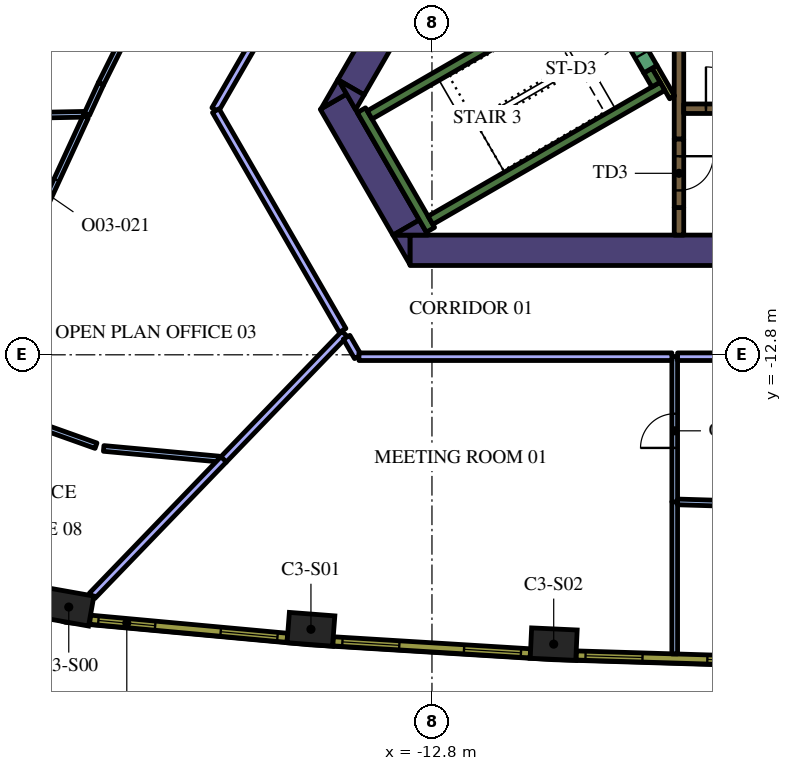
"""IFC4 building model, lengths in metres.
Left out: names, types, materials, properties, quantities, classifications, styles, units other than length and angle.
Written with IfcOpenShell. Run it as: python <this file> out.ifc"""

import sys

from ifc_helpers import new_model, si_unit, direction, frame, frame_2d, origin, origin_2d, place, context, subcontext, project, spatial, polyline, rectangle, outline, extrude, element, fill, save


model = new_model("IFC4")
c1 = context("Model", 3, precision=1e-05, world=origin(), true_north=direction((0.0, 1.0)))
c2 = subcontext(c1, "Body", "Model", "MODEL_VIEW")
j1 = project(units=[si_unit("LENGTHUNIT", "METRE"), si_unit("PLANEANGLEUNIT", "RADIAN")], contexts=[c1])
p1 = place(None, origin())
s1 = spatial("IfcSite", under=j1, at=p1, CompositionType="ELEMENT")
p2 = place(p1, origin())
s2 = spatial("IfcBuilding", under=s1, at=p2, CompositionType="ELEMENT")
p3 = place(p2, frame((0.0, 0.0, 166.8)))
s3 = spatial("IfcBuildingStorey", under=s2, at=p3, CompositionType="ELEMENT", Elevation=166.8)
for number, where, z_axis, x_axis in (
    (1, (-22.357, -19.437, 0.0), (0.0, 0.0, 1.0), (0.985, -0.175, 0.0)),
    (2, (-15.985, -20.022, 0.0), (0.0, 0.0, 1.0), (0.997, -0.076, 0.0)),
    (3, (-9.597, -20.413, 0.0), (0.0, 0.0, 1.0), (0.999, -0.046, 0.0)),
):
    element("IfcColumn", number, at=place(p3, frame(where, z_axis=z_axis, x_axis=x_axis)), inside=s3, PredefinedType="COLUMN", context=c2, shape_type="SweptSolid", body=[
        extrude(rectangle(XDim=1.2, YDim=0.8, at=origin_2d()), origin(), (0.0, 0.0, 1.0), 4.2),
    ])
p4 = place(p3, frame((-13.378, -10.05, 0.0), z_axis=(0.0, 0.0, 1.0), x_axis=(1.0, 0.0, 0.0)))
e4 = element("IfcWall", 4, at=p4, inside=s3, PredefinedType="SOLIDWALL", context=c2, shape_type="SweptSolid", body=[
    extrude(rectangle(XDim=22.282, YDim=0.8, at=frame_2d((11.141, 0.0))), origin(), (0.0, 0.0, 1.0), 4.2),
])
p5 = place(p3, origin())
e5 = element("IfcWall", 5, at=p5, inside=s3, PredefinedType="SOLIDWALL", context=c2, shape_type="SweptSolid", body=[
    extrude(outline(polyline([(-13.828, -9.65), (-13.38, -9.65), (-13.38, -10.426), (-13.828, -9.65)])), origin(), (0.0, 0.0, 1.0), 4.2),
])
p6 = place(p3, frame((-15.392, -6.14, 0.0), z_axis=(0.0, 0.0, 1.0), x_axis=(0.499984020225, -0.866034629516, 0.0)))
e6 = element("IfcWall", 6, at=p6, inside=s3, PredefinedType="SOLIDWALL", context=c2, shape_type="SweptSolid", body=[
    extrude(rectangle(XDim=3.824, YDim=0.8, at=frame_2d((1.912, 0.0))), origin(), (0.0, 0.0, 1.0), 4.2),
])
e7 = element("IfcWall", 7, at=p5, inside=s3, PredefinedType="SOLIDWALL", context=c2, shape_type="SweptSolid", body=[
    extrude(outline(polyline([(-15.047, -5.938), (-15.719, -6.326), (-15.271, -5.55), (-15.047, -5.938)])), origin(), (0.0, 0.0, 1.0), 4.2),
])
e8 = element("IfcWall", 8, at=p5, inside=s3, PredefinedType="SOLIDWALL", context=c2, shape_type="SweptSolid", body=[
    extrude(outline(polyline([(-12.904, -9.65), (-13.82, -9.65), (-13.133, -9.253), (-12.904, -9.65)])), origin(), (0.0, 0.0, 1.0), 4.2),
])
p7 = place(p3, frame((-13.518, -3.314, 0.0), z_axis=(0.0, 0.0, 1.0), x_axis=(-0.499969377405, -0.866043083026, 0.0)))
e9 = element("IfcWall", 9, at=p7, inside=s3, PredefinedType="SOLIDWALL", context=c2, shape_type="SweptSolid", body=[
    extrude(rectangle(XDim=2.824, YDim=0.8, at=frame_2d((1.412, 0.0))), origin(), (0.0, 0.0, 1.0), 4.2),
])
e10 = element("IfcWall", 10, at=p5, inside=s3, PredefinedType="SOLIDWALL", context=c2, shape_type="SweptSolid", body=[
    extrude(outline(polyline([(-14.809, -6.35), (-15.257, -5.574), (-14.585, -5.962), (-14.809, -6.35)])), origin(), (0.0, 0.0, 1.0), 4.2),
])
p8 = place(p3, frame((-12.84, -9.511, 0.0), z_axis=(0.0, 0.0, 1.0), x_axis=(-0.499997733992, 0.866026712061, 0.0)))
e11 = element("IfcWall", 11, at=p8, inside=s3, PredefinedType="SOLIDWALL", context=c2, shape_type="SweptSolid", body=[
    extrude(rectangle(XDim=3.634, YDim=0.25, at=frame_2d((1.817, 0.0))), origin(), (0.0, 0.0, 1.0), 4.2),
])
p9 = place(p3, frame((-14.44, -6.49, 0.0), z_axis=(0.0, 0.0, 1.0), x_axis=(0.866022966069, 0.500004222222, 0.0)))
e12 = element("IfcWall", 12, at=p9, inside=s3, PredefinedType="SOLIDWALL", context=c2, shape_type="SweptSolid", body=[
    extrude(rectangle(XDim=6.8, YDim=0.25, at=frame_2d((3.4, 0.0))), origin(), (0.0, 0.0, 1.0), 4.2),
])
p10 = place(p3, frame((-12.84, -9.261, 0.0), z_axis=(0.0, 0.0, 1.0), x_axis=(0.866016039709, 0.500016218704, 0.0)))
e13 = element("IfcWall", 13, at=p10, inside=s3, PredefinedType="SOLIDWALL", context=c2, shape_type="SweptSolid", body=[
    extrude(rectangle(XDim=7.05, YDim=0.25, at=frame_2d((3.525, 0.0))), origin(), (0.0, 0.0, 1.0), 4.2),
])
p11 = place(p3, frame((-6.905, -5.69, 0.0), z_axis=(0.0, 0.0, 1.0), x_axis=(-0.500402024738, 0.865793170242, 0.0)))
e14 = element("IfcWall", 14, at=p11, inside=s3, PredefinedType="SOLIDWALL", context=c2, shape_type="SweptSolid", body=[
    extrude(rectangle(XDim=0.425, YDim=0.25, at=frame_2d((0.212, 0.0))), origin(), (0.0, 0.0, 1.0), 4.2),
])
p12 = place(p3, frame((-6.3, -8.925, 0.0), z_axis=(0.0, 0.0, 1.0), x_axis=(0.0, -1.0, 0.0)))
e15 = element("IfcWall", 15, at=p12, inside=s3, PredefinedType="SOLIDWALL", context=c2, shape_type="SweptSolid", body=[
    extrude(rectangle(XDim=0.725, YDim=0.25, at=frame_2d((0.363, 0.0))), origin(), (0.0, 0.0, 1.0), 4.2),
])
p13 = place(p3, frame((-6.3, -7.125, 0.0), z_axis=(0.0, 0.0, 1.0), x_axis=(0.0, 1.0, 0.0)))
e16 = element("IfcWall", 16, at=p13, inside=s3, PredefinedType="SOLIDWALL", context=c2, shape_type="SweptSolid", body=[
    extrude(rectangle(XDim=3.125, YDim=0.25, at=frame_2d((1.562, 0.0))), origin(), (0.0, 0.0, 1.0), 4.2),
])
p14 = place(p3, frame((-6.48, -6.027, 0.0), z_axis=(0.0, 0.0, 1.0), x_axis=(-0.499927229454, 0.866067413802, 0.0)))
e17 = element("IfcWall", 17, at=p14, inside=s3, PredefinedType="PARTITIONING", context=c2, shape_type="SweptSolid", body=[
    extrude(rectangle(XDim=0.929, YDim=0.15, at=frame_2d((0.464, 0.0))), origin(), (0.0, 0.0, 1.0), 4.2),
])
p15 = place(p3, frame((-6.175, -6.325, 0.0), z_axis=(0.0, 0.0, 1.0), x_axis=(1.0, 0.0, 0.0)))
e18 = element("IfcWall", 18, at=p15, inside=s3, PredefinedType="SOLIDWALL", context=c2, shape_type="SweptSolid", body=[
    extrude(rectangle(XDim=12.35, YDim=0.25, at=frame_2d((6.175, 0.0))), origin(), (0.0, 0.0, 1.0), 4.2),
])
p16 = place(p15, frame((0.585, 0.0, 0.0)))
e19 = element("IfcOpeningElement", 19, at=p16, cuts=e18, PredefinedType="OPENING", context=c2, shape_type="SweptSolid", body=[
    extrude(rectangle(XDim=1.1, YDim=2.1, at=frame_2d((0.55, 1.05))), frame((0.0, 0.135, 0.0), z_axis=(0.0, -1.0, 0.0), x_axis=(1.0, 0.0, 0.0)), (0.0, 0.0, 1.0), 0.27),
])
p17 = place(p15, frame((3.105, 0.0, 0.0)))
e20 = element("IfcOpeningElement", 20, at=p17, cuts=e18, PredefinedType="OPENING", context=c2, shape_type="SweptSolid", body=[
    extrude(rectangle(XDim=1.1, YDim=2.1, at=frame_2d((0.55, 1.05))), frame((0.0, 0.135, 0.0), z_axis=(0.0, -1.0, 0.0), x_axis=(1.0, 0.0, 0.0)), (0.0, 0.0, 1.0), 0.27),
])
p18 = place(p15, frame((5.625, 0.0, 0.0)))
e21 = element("IfcOpeningElement", 21, at=p18, cuts=e18, PredefinedType="OPENING", context=c2, shape_type="SweptSolid", body=[
    extrude(rectangle(XDim=1.1, YDim=2.1, at=frame_2d((0.55, 1.05))), frame((0.0, 0.135, 0.0), z_axis=(0.0, -1.0, 0.0), x_axis=(1.0, 0.0, 0.0)), (0.0, 0.0, 1.0), 0.27),
])
p19 = place(p15, frame((8.145, 0.0, 0.0)))
e22 = element("IfcOpeningElement", 22, at=p19, cuts=e18, PredefinedType="OPENING", context=c2, shape_type="SweptSolid", body=[
    extrude(rectangle(XDim=1.1, YDim=2.1, at=frame_2d((0.55, 1.05))), frame((0.0, 0.135, 0.0), z_axis=(0.0, -1.0, 0.0), x_axis=(1.0, 0.0, 0.0)), (0.0, 0.0, 1.0), 0.27),
])
p20 = place(p15, frame((10.665, 0.0, 0.0)))
e23 = element("IfcOpeningElement", 23, at=p20, cuts=e18, PredefinedType="OPENING", context=c2, shape_type="SweptSolid", body=[
    extrude(rectangle(XDim=1.1, YDim=2.1, at=frame_2d((0.55, 1.05))), frame((0.0, 0.135, 0.0), z_axis=(0.0, -1.0, 0.0), x_axis=(1.0, 0.0, 0.0)), (0.0, 0.0, 1.0), 0.27),
])
p21 = place(p3, frame((-8.103, -3.466, 0.0), z_axis=(0.0, 0.0, 1.0), x_axis=(0.500078061341, -0.865980330357, 0.0)))
e24 = element("IfcWall", 24, at=p21, inside=s3, PredefinedType="SOLIDWALL", context=c2, shape_type="SweptSolid", body=[
    extrude(rectangle(XDim=2.1, YDim=0.4, at=frame_2d((1.05, 0.0))), origin(), (0.0, 0.0, 1.0), 4.2),
])
p22 = place(p21, frame((0.45, 0.0, 0.0)))
e25 = element("IfcOpeningElement", 25, at=p22, cuts=e24, PredefinedType="OPENING", context=c2, shape_type="SweptSolid", body=[
    extrude(rectangle(XDim=1.2, YDim=2.1, at=frame_2d((0.6, 1.05))), frame((0.0, 0.21, 0.0), z_axis=(0.0, -1.0, 0.0), x_axis=(1.0, 0.0, 0.0)), (0.0, 0.0, 1.0), 0.42),
])
p23 = place(p3, frame((-6.3, -7.125, 0.0), z_axis=(0.0, 0.0, 1.0), x_axis=(0.0, -1.0, 0.0)))
e26 = element("IfcWall", 26, at=p23, inside=s3, PredefinedType="SOLIDWALL", context=c2, shape_type="SweptSolid", body=[
    extrude(rectangle(XDim=1.8, YDim=0.25, at=frame_2d((0.9, 0.0))), origin(), (0.0, 0.0, 1.0), 4.2),
])
p24 = place(p23, frame((0.45, 0.0, 0.0)))
e27 = element("IfcOpeningElement", 27, at=p24, cuts=e26, PredefinedType="OPENING", context=c2, shape_type="SweptSolid", body=[
    extrude(rectangle(XDim=0.9, YDim=2.1, at=frame_2d((0.45, 1.05))), frame((0.0, 0.135, 0.0), z_axis=(0.0, -1.0, 0.0), x_axis=(1.0, 0.0, 0.0)), (0.0, 0.0, 1.0), 0.27),
])
p25 = place(p3, frame((-6.412, -16.664, 0.0), z_axis=(0.0, 0.0, 1.0), x_axis=(0.0, -1.0, 0.0)))
e28 = element("IfcWall", 28, at=p25, inside=s3, PredefinedType="PARTITIONING", context=c2, shape_type="SweptSolid", body=[
    extrude(rectangle(XDim=4.006, YDim=0.15, at=frame_2d((2.003, 0.0))), origin(), (0.0, 0.0, 1.0), 3.15),
])
p26 = place(p3, frame((-6.412, -16.672, 0.0), z_axis=(0.0, 0.0, 1.0), x_axis=(0.0, 1.0, 0.0)))
e29 = element("IfcWall", 29, at=p26, inside=s3, PredefinedType="PARTITIONING", context=c2, shape_type="SweptSolid", body=[
    extrude(rectangle(XDim=3.822, YDim=0.15, at=frame_2d((1.911, 0.0))), origin(), (0.0, 0.0, 1.0), 3.15),
])
p27 = place(p26, frame((1.422, 0.0, 0.0)))
e30 = element("IfcOpeningElement", 30, at=p27, cuts=e29, PredefinedType="OPENING", context=c2, shape_type="SweptSolid", body=[
    extrude(rectangle(XDim=0.9, YDim=2.1, at=frame_2d((0.45, 1.05))), frame((0.0, 0.085, 0.0), z_axis=(0.0, -1.0, 0.0), x_axis=(1.0, 0.0, 0.0)), (0.0, 0.0, 1.0), 0.17),
])
p28 = place(p3, frame((-18.288, -15.557, 0.0), z_axis=(0.0, 0.0, 1.0), x_axis=(0.693944823318, 0.720028181525, 0.0)))
e31 = element("IfcWall", 31, at=p28, inside=s3, PredefinedType="PARTITIONING", context=c2, shape_type="SweptSolid", body=[
    extrude(rectangle(XDim=4.596, YDim=0.2, at=frame_2d((2.298, 0.0))), origin(), (0.0, 0.0, 1.0), 3.15),
])
p29 = place(p3, frame((-21.742, -19.14, 0.0), z_axis=(0.0, 0.0, 1.0), x_axis=(0.693986944276, 0.719987584042, 0.0)))
e32 = element("IfcWall", 32, at=p29, inside=s3, PredefinedType="PARTITIONING", context=c2, shape_type="SweptSolid", body=[
    extrude(rectangle(XDim=4.986, YDim=0.2, at=frame_2d((2.493, 0.0))), origin(), (0.0, 0.0, 1.0), 3.15),
])
p30 = place(p3, frame((-15.047, -12.338, 0.0), z_axis=(0.0, 0.0, 1.0), x_axis=(0.500091824179, -0.865972382579, 0.0)))
e33 = element("IfcWall", 33, at=p30, inside=s3, PredefinedType="PARTITIONING", context=c2, shape_type="SweptSolid", body=[
    extrude(rectangle(XDim=0.591, YDim=0.2, at=frame_2d((0.296, 0.0))), origin(), (0.0, 0.0, 1.0), 3.15),
])
p31 = place(p3, frame((-14.721, -12.85, 0.0), z_axis=(0.0, 0.0, 1.0), x_axis=(1.0, 0.0, 0.0)))
e34 = element("IfcWall", 34, at=p31, inside=s3, PredefinedType="PARTITIONING", context=c2, shape_type="SweptSolid", body=[
    extrude(rectangle(XDim=8.234, YDim=0.2, at=frame_2d((4.117, 0.0))), origin(), (0.0, 0.0, 1.0), 3.15),
])
p32 = place(p3, frame((-6.337, -16.671, 0.0), z_axis=(0.0, 0.0, 1.0), x_axis=(0.999533369646, -0.030545751995, 0.0)))
e35 = element("IfcWall", 35, at=p32, inside=s3, PredefinedType="PARTITIONING", context=c2, shape_type="SweptSolid", body=[
    extrude(rectangle(XDim=3.197, YDim=0.15, at=frame_2d((1.599, 0.0))), origin(), (0.0, 0.0, 1.0), 3.15),
])
p33 = place(p3, frame((-6.337, -12.85, 0.0), z_axis=(0.0, 0.0, 1.0), x_axis=(1.0, 0.0, 0.0)))
e36 = element("IfcWall", 36, at=p33, inside=s3, PredefinedType="PARTITIONING", context=c2, shape_type="SweptSolid", body=[
    extrude(rectangle(XDim=2.303, YDim=0.2, at=frame_2d((1.151, 0.0))), origin(), (0.0, 0.0, 1.0), 3.15),
])
p34 = place(p3, frame((-21.509, -5.666, 0.0), z_axis=(0.0, 0.0, 1.0), x_axis=(0.446192228952, 0.894937145739, 0.0)))
e37 = element("IfcWall", 37, at=p34, inside=s3, PredefinedType="PARTITIONING", context=c2, shape_type="SweptSolid", body=[
    extrude(rectangle(XDim=2.774, YDim=0.15, at=frame_2d((1.387, 0.0))), origin(), (0.0, 0.0, 1.0), 3.15),
])
p35 = place(p34, frame((0.973, 0.0, 0.0)))
e38 = element("IfcOpeningElement", 38, at=p35, cuts=e37, PredefinedType="OPENING", context=c2, shape_type="SweptSolid", body=[
    extrude(rectangle(XDim=0.9, YDim=2.1, at=frame_2d((0.45, 1.05))), frame((0.0, 0.085, 0.0), z_axis=(0.0, -1.0, 0.0), x_axis=(1.0, 0.0, 0.0)), (0.0, 0.0, 1.0), 0.17),
])
p36 = place(p3, frame((-21.509, -5.666, 0.0), z_axis=(0.0, 0.0, 1.0), x_axis=(-0.4188658149, -0.908048142506, 0.0)))
e39 = element("IfcWall", 39, at=p36, inside=s3, PredefinedType="PARTITIONING", context=c2, shape_type="SweptSolid", body=[
    extrude(rectangle(XDim=0.885, YDim=0.15, at=frame_2d((0.443, 0.0))), origin(), (0.0, 0.0, 1.0), 3.15),
])
p37 = place(p3, frame((-21.963, -6.472, 0.0), z_axis=(0.0, 0.0, 1.0), x_axis=(-0.999809788098, -0.019503528505, 0.0)))
e40 = element("IfcWall", 40, at=p37, inside=s3, PredefinedType="PARTITIONING", context=c2, shape_type="SweptSolid", body=[
    extrude(rectangle(XDim=4.807, YDim=0.15, at=frame_2d((2.403, 0.0))), origin(), (0.0, 0.0, 1.0), 3.15),
])
p38 = place(p3, frame((-18.412, -15.542, 0.0), z_axis=(0.0, 0.0, 1.0), x_axis=(-0.995812481052, 0.091419377496, 0.0)))
e41 = element("IfcWall", 41, at=p38, inside=s3, PredefinedType="PARTITIONING", context=c2, shape_type="SweptSolid", body=[
    extrude(rectangle(XDim=3.039, YDim=0.15, at=frame_2d((1.52, 0.0))), origin(), (0.0, 0.0, 1.0), 3.15),
])
p39 = place(p3, frame((-21.64, -15.192, 0.0), z_axis=(0.0, 0.0, 1.0), x_axis=(-0.942099140138, 0.335334475041, 0.0)))
e42 = element("IfcWall", 42, at=p39, inside=s3, PredefinedType="PARTITIONING", context=c2, shape_type="SweptSolid", body=[
    extrude(rectangle(XDim=1.498, YDim=0.15, at=frame_2d((0.749, 0.0))), origin(), (0.0, 0.0, 1.0), 3.15),
])
p40 = place(p3, frame((-23.848, -10.74, 0.0), z_axis=(0.0, 0.0, 1.0), x_axis=(0.418723219841, 0.908113905392, 0.0)))
e43 = element("IfcWall", 43, at=p40, inside=s3, PredefinedType="PARTITIONING", context=c2, shape_type="SweptSolid", body=[
    extrude(rectangle(XDim=4.623, YDim=0.15, at=frame_2d((2.311, 0.0))), origin(), (0.0, 0.0, 1.0), 3.15),
])
p41 = place(p40, frame((1.9, 0.0, 0.0)))
e44 = element("IfcOpeningElement", 44, at=p41, cuts=e43, PredefinedType="OPENING", context=c2, shape_type="SweptSolid", body=[
    extrude(rectangle(XDim=0.9, YDim=2.1, at=frame_2d((0.45, 1.05))), frame((0.0, 0.085, 0.0), z_axis=(0.0, -1.0, 0.0), x_axis=(1.0, 0.0, 0.0)), (0.0, 0.0, 1.0), 0.17),
])
p42 = place(p3, frame((-13.146, 2.931, 0.0), z_axis=(0.0, 0.0, 1.0), x_axis=(-0.499997861235, -0.866026638597, 0.0)))
e45 = element("IfcWall", 45, at=p42, inside=s3, PredefinedType="PARTITIONING", context=c2, shape_type="SweptSolid", body=[
    extrude(rectangle(XDim=10.717, YDim=0.2, at=frame_2d((5.359, 0.0))), origin(), (0.0, 0.0, 1.0), 3.15),
])
p43 = place(p42, frame((4.9, 0.0, 0.0)))
e46 = element("IfcOpeningElement", 46, at=p43, cuts=e45, PredefinedType="OPENING", context=c2, shape_type="SweptSolid", body=[
    extrude(rectangle(XDim=1.0, YDim=2.1, at=frame_2d((0.5, 1.05))), frame((0.0, 0.11, 0.0), z_axis=(0.0, -1.0, 0.0), x_axis=(1.0, 0.0, 0.0)), (0.0, 0.0, 1.0), 0.22),
])
p44 = place(p3, frame((-18.489, -6.376, 0.0), z_axis=(0.0, 0.0, 1.0), x_axis=(0.499989401968, -0.866031522475, 0.0)))
e47 = element("IfcWall", 47, at=p44, inside=s3, PredefinedType="PARTITIONING", context=c2, shape_type="SweptSolid", body=[
    extrude(rectangle(XDim=6.677, YDim=0.2, at=frame_2d((3.338, 0.0))), origin(), (0.0, 0.0, 1.0), 3.15),
])
p45 = place(p3, frame((-21.797, -19.77, 0.0), z_axis=(0.0, 0.0, 1.0), x_axis=(0.995808712151, -0.091460422067, 0.0)))
e48 = element("IfcWall", 48, at=p45, inside=s3, PredefinedType="SOLIDWALL", context=c2, shape_type="SweptSolid", body=[
    extrude(rectangle(XDim=5.213, YDim=0.24, at=frame_2d((2.606, 0.0))), origin(), (0.0, 0.0, 1.0), 3.95),
])
p46 = place(p45, frame((0.221, 0.0, 0.9)))
e49 = element("IfcOpeningElement", 49, at=p46, cuts=e48, PredefinedType="OPENING", context=c2, shape_type="SweptSolid", body=[
    extrude(rectangle(XDim=1.5, YDim=2.55, at=frame_2d((0.75, 1.275))), frame((0.0, 0.13, 0.0), z_axis=(0.0, -1.0, 0.0), x_axis=(1.0, 0.0, 0.0)), (0.0, 0.0, 1.0), 0.26),
])
p47 = place(p45, frame((3.452, 0.0, 0.9)))
e50 = element("IfcOpeningElement", 50, at=p47, cuts=e48, PredefinedType="OPENING", context=c2, shape_type="SweptSolid", body=[
    extrude(rectangle(XDim=1.5, YDim=2.55, at=frame_2d((0.75, 1.275))), frame((0.0, 0.13, 0.0), z_axis=(0.0, -1.0, 0.0), x_axis=(1.0, 0.0, 0.0)), (0.0, 0.0, 1.0), 0.26),
])
p48 = place(p3, frame((-15.405, -20.338, 0.0), z_axis=(0.0, 0.0, 1.0), x_axis=(0.998135294646, -0.061040425794, 0.0)))
e51 = element("IfcWall", 51, at=p48, inside=s3, PredefinedType="SOLIDWALL", context=c2, shape_type="SweptSolid", body=[
    extrude(rectangle(XDim=5.204, YDim=0.24, at=frame_2d((2.602, 0.0))), origin(), (0.0, 0.0, 1.0), 3.95),
])
p49 = place(p48, frame((0.248, 0.0, 0.9)))
e52 = element("IfcOpeningElement", 52, at=p49, cuts=e51, PredefinedType="OPENING", context=c2, shape_type="SweptSolid", body=[
    extrude(rectangle(XDim=1.5, YDim=2.55, at=frame_2d((0.75, 1.275))), frame((0.0, 0.13, 0.0), z_axis=(0.0, -1.0, 0.0), x_axis=(1.0, 0.0, 0.0)), (0.0, 0.0, 1.0), 0.26),
])
p50 = place(p48, frame((3.455, 0.0, 0.9)))
e53 = element("IfcOpeningElement", 53, at=p50, cuts=e51, PredefinedType="OPENING", context=c2, shape_type="SweptSolid", body=[
    extrude(rectangle(XDim=1.5, YDim=2.55, at=frame_2d((0.75, 1.275))), frame((0.0, 0.13, 0.0), z_axis=(0.0, -1.0, 0.0), x_axis=(1.0, 0.0, 0.0)), (0.0, 0.0, 1.0), 0.26),
])
p51 = place(p3, frame((-9.007, -20.711, 0.0), z_axis=(0.0, 0.0, 1.0), x_axis=(0.999533441983, -0.030543384845, 0.0)))
e54 = element("IfcWall", 54, at=p51, inside=s3, PredefinedType="SOLIDWALL", context=c2, shape_type="SweptSolid", body=[
    extrude(rectangle(XDim=5.204, YDim=0.24, at=frame_2d((2.602, 0.0))), origin(), (0.0, 0.0, 1.0), 3.95),
])
p52 = place(p51, frame((0.248, 0.0, 0.9)))
e55 = element("IfcOpeningElement", 55, at=p52, cuts=e54, PredefinedType="OPENING", context=c2, shape_type="SweptSolid", body=[
    extrude(rectangle(XDim=1.5, YDim=2.55, at=frame_2d((0.75, 1.275))), frame((0.0, 0.13, 0.0), z_axis=(0.0, -1.0, 0.0), x_axis=(1.0, 0.0, 0.0)), (0.0, 0.0, 1.0), 0.26),
])
p53 = place(p51, frame((3.455, 0.0, 0.9)))
e56 = element("IfcOpeningElement", 56, at=p53, cuts=e54, PredefinedType="OPENING", context=c2, shape_type="SweptSolid", body=[
    extrude(rectangle(XDim=1.5, YDim=2.55, at=frame_2d((0.75, 1.275))), frame((0.0, 0.13, 0.0), z_axis=(0.0, -1.0, 0.0), x_axis=(1.0, 0.0, 0.0)), (0.0, 0.0, 1.0), 0.26),
])
p54 = place(p16, origin())
e57 = element("IfcDoor", 57, at=p54, inside=s3, OperationType="DOUBLE_DOOR_SLIDING", PredefinedType="DOOR", context=c2, shape_type="SweptSolid", body=[
    extrude(rectangle(XDim=1.1, YDim=2.1, at=frame_2d((0.55, 1.05))), frame((0.0, 0.025, 0.0), z_axis=(0.0, -1.0, 0.0), x_axis=(1.0, 0.0, 0.0)), (0.0, 0.0, 1.0), 0.05),
])
fill(e19, e57)
p55 = place(p22, origin())
e58 = element("IfcDoor", 58, at=p55, inside=s3, OperationType="SINGLE_SWING_LEFT", PredefinedType="DOOR", context=c2, shape_type="SweptSolid", body=[
    extrude(rectangle(XDim=1.2, YDim=2.1, at=frame_2d((0.6, 1.05))), frame((0.0, 0.025, 0.0), z_axis=(0.0, -1.0, 0.0), x_axis=(1.0, 0.0, 0.0)), (0.0, 0.0, 1.0), 0.05),
])
fill(e25, e58)
p56 = place(p24, origin())
e59 = element("IfcDoor", 59, at=p56, inside=s3, OperationType="SINGLE_SWING_LEFT", PredefinedType="DOOR", context=c2, shape_type="SweptSolid", body=[
    extrude(rectangle(XDim=0.9, YDim=2.1, at=frame_2d((0.45, 1.05))), frame((0.0, 0.025, 0.0), z_axis=(0.0, -1.0, 0.0), x_axis=(1.0, 0.0, 0.0)), (0.0, 0.0, 1.0), 0.05),
])
fill(e27, e59)
p57 = place(p27, origin())
e60 = element("IfcDoor", 60, at=p57, inside=s3, OperationType="SINGLE_SWING_LEFT", PredefinedType="DOOR", context=c2, shape_type="SweptSolid", body=[
    extrude(rectangle(XDim=0.9, YDim=2.1, at=frame_2d((0.45, 1.05))), frame((0.0, 0.025, 0.0), z_axis=(0.0, -1.0, 0.0), x_axis=(1.0, 0.0, 0.0)), (0.0, 0.0, 1.0), 0.05),
])
fill(e30, e60)
p58 = place(p41, origin())
e61 = element("IfcDoor", 61, at=p58, inside=s3, OperationType="SINGLE_SWING_RIGHT", PredefinedType="DOOR", context=c2, shape_type="SweptSolid", body=[
    extrude(rectangle(XDim=0.9, YDim=2.1, at=frame_2d((0.45, 1.05))), frame((0.0, 0.025, 0.0), z_axis=(0.0, -1.0, 0.0), x_axis=(1.0, 0.0, 0.0)), (0.0, 0.0, 1.0), 0.05),
])
fill(e44, e61)
p59 = place(p46, origin())
e62 = element("IfcWindow", 62, at=p59, inside=s3, PartitioningType="SINGLE_PANEL", PredefinedType="WINDOW", context=c2, shape_type="SweptSolid", body=[
    extrude(rectangle(XDim=1.5, YDim=2.55, at=frame_2d((0.75, 1.275))), frame((0.0, 0.04, 0.0), z_axis=(0.0, -1.0, 0.0), x_axis=(1.0, 0.0, 0.0)), (0.0, 0.0, 1.0), 0.06),
])
fill(e49, e62)
p60 = place(p47, origin())
e63 = element("IfcWindow", 63, at=p60, inside=s3, PartitioningType="SINGLE_PANEL", PredefinedType="WINDOW", context=c2, shape_type="SweptSolid", body=[
    extrude(rectangle(XDim=1.5, YDim=2.55, at=frame_2d((0.75, 1.275))), frame((0.0, 0.04, 0.0), z_axis=(0.0, -1.0, 0.0), x_axis=(1.0, 0.0, 0.0)), (0.0, 0.0, 1.0), 0.06),
])
fill(e50, e63)
p61 = place(p49, origin())
e64 = element("IfcWindow", 64, at=p61, inside=s3, PartitioningType="SINGLE_PANEL", PredefinedType="WINDOW", context=c2, shape_type="SweptSolid", body=[
    extrude(rectangle(XDim=1.5, YDim=2.55, at=frame_2d((0.75, 1.275))), frame((0.0, 0.04, 0.0), z_axis=(0.0, -1.0, 0.0), x_axis=(1.0, 0.0, 0.0)), (0.0, 0.0, 1.0), 0.06),
])
fill(e52, e64)
p62 = place(p50, origin())
e65 = element("IfcWindow", 65, at=p62, inside=s3, PartitioningType="SINGLE_PANEL", PredefinedType="WINDOW", context=c2, shape_type="SweptSolid", body=[
    extrude(rectangle(XDim=1.5, YDim=2.55, at=frame_2d((0.75, 1.275))), frame((0.0, 0.04, 0.0), z_axis=(0.0, -1.0, 0.0), x_axis=(1.0, 0.0, 0.0)), (0.0, 0.0, 1.0), 0.06),
])
fill(e53, e65)
p63 = place(p52, origin())
e66 = element("IfcWindow", 66, at=p63, inside=s3, PartitioningType="SINGLE_PANEL", PredefinedType="WINDOW", context=c2, shape_type="SweptSolid", body=[
    extrude(rectangle(XDim=1.5, YDim=2.55, at=frame_2d((0.75, 1.275))), frame((0.0, 0.04, 0.0), z_axis=(0.0, -1.0, 0.0), x_axis=(1.0, 0.0, 0.0)), (0.0, 0.0, 1.0), 0.06),
])
fill(e55, e66)
p64 = place(p53, origin())
e67 = element("IfcWindow", 67, at=p64, inside=s3, PartitioningType="SINGLE_PANEL", PredefinedType="WINDOW", context=c2, shape_type="SweptSolid", body=[
    extrude(rectangle(XDim=1.5, YDim=2.55, at=frame_2d((0.75, 1.275))), frame((0.0, 0.04, 0.0), z_axis=(0.0, -1.0, 0.0), x_axis=(1.0, 0.0, 0.0)), (0.0, 0.0, 1.0), 0.06),
])
fill(e56, e67)
save(model, sys.argv[1])
